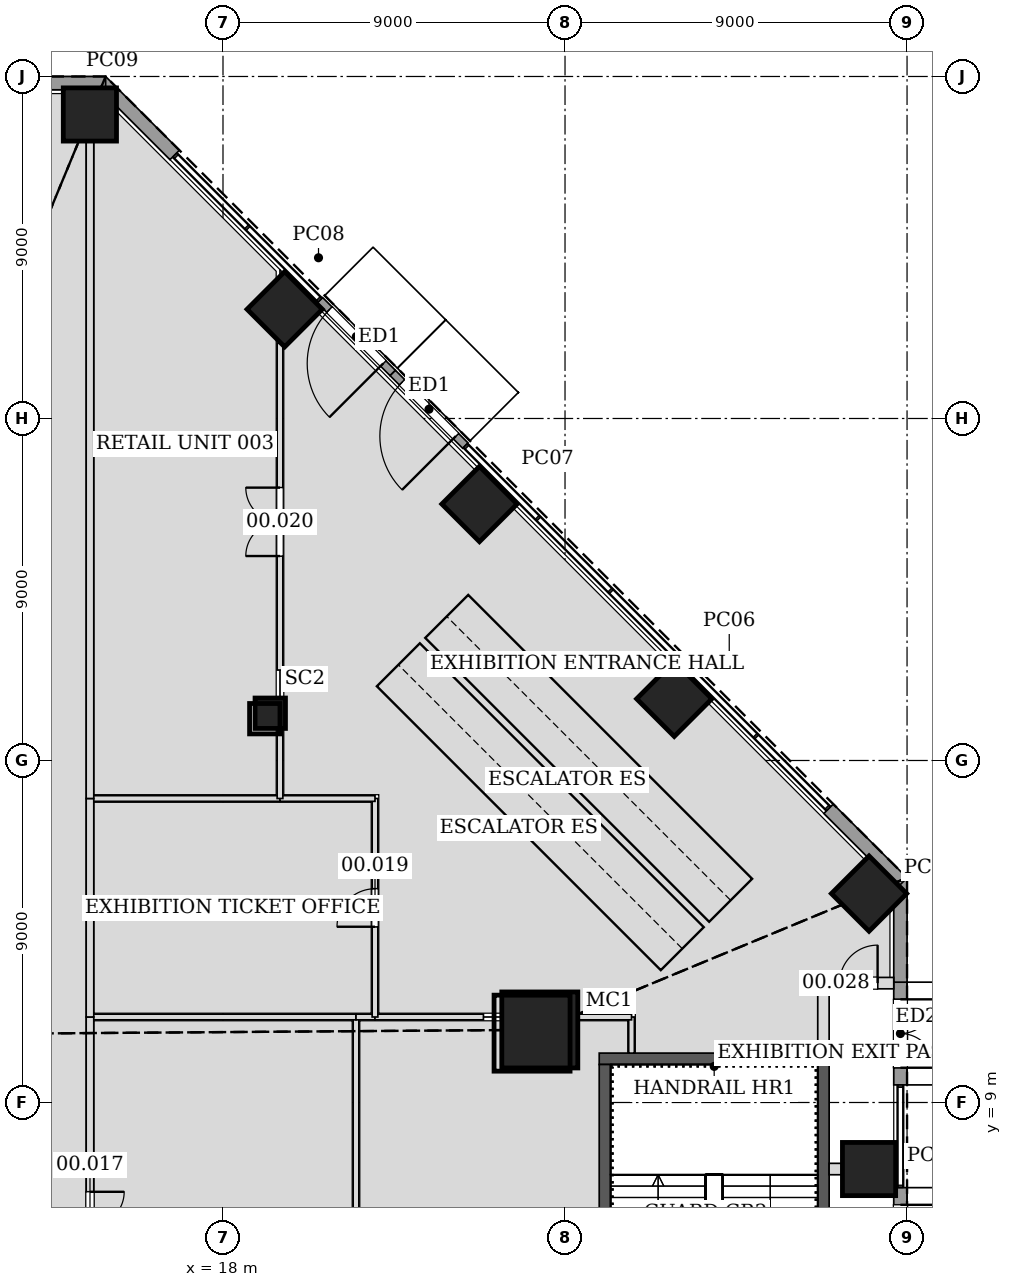
"""IFC4 building model, lengths in metres.
Left out: names, types, materials, properties, quantities, classifications, styles, units other than length and angle.
Written with IfcOpenShell. Run it as: python <this file> out.ifc"""

import sys

from ifc_helpers import new_model, si_unit, direction, frame, frame_2d, origin, origin_2d, place, context, subcontext, project, spatial, rectangle, hollow_rectangle, extrude, element, fill, save


model = new_model("IFC4")
c1 = context("Model", 3, precision=1e-05, world=origin(), true_north=direction((0.0, 1.0)))
c2 = subcontext(c1, "Body", "Model", "MODEL_VIEW")
j1 = project(units=[si_unit("LENGTHUNIT", "METRE"), si_unit("PLANEANGLEUNIT", "RADIAN")], contexts=[c1])
p1 = place(None, origin())
s1 = spatial("IfcSite", under=j1, at=p1, CompositionType="ELEMENT")
p2 = place(p1, origin())
s2 = spatial("IfcBuilding", under=s1, at=p2, CompositionType="ELEMENT")
p3 = place(p2, origin())
s3 = spatial("IfcBuildingStorey", under=s2, at=p3, CompositionType="ELEMENT", Elevation=0.0)
p4 = place(p3, frame((26.336, 10.909, 0.0), z_axis=(-0.028266568786, -0.011726897842, 0.999531630793), x_axis=(0.383199413132, -0.923665637433, 0.0)))
e1 = element("IfcColumn", 1, at=p4, inside=s3, PredefinedType="COLUMN", context=c2, shape_type="SweptSolid", body=[
    extrude(hollow_rectangle(XDim=2.0, YDim=2.0, WallThickness=0.09, at=origin_2d()), origin(), (0.0, 0.0, 1.0), 7.203),
])
p5 = place(p3, frame((19.244, 19.244, 0.0), z_axis=(-0.019998101035, -0.019998101035, 0.999599995953), x_axis=(0.707106781187, -0.707106781187, 0.0)))
e2 = element("IfcColumn", 2, at=p5, inside=s3, PredefinedType="COLUMN", context=c2, shape_type="SweptSolid", body=[
    extrude(hollow_rectangle(XDim=0.8, YDim=0.8, WallThickness=0.05, at=origin_2d()), origin(), (0.0, 0.0, 1.0), 7.203),
])
for number, where, z_axis, x_axis in (
    (3, (35.0, 7.249, 0.0), (0.0, 0.0, 1.0), (1.0, 0.0, 0.0)),
    (4, (35.0, 14.498, 0.0), (0.0, 0.0, 1.0), (0.707, 0.707, 0.0)),
    (5, (29.874, 19.623, 0.0), (0.0, 0.0, 1.0), (0.707, 0.707, 0.0)),
    (6, (24.749, 24.749, 0.0), (0.0, 0.0, 1.0), (0.707, 0.707, 0.0)),
    (7, (19.623, 29.874, 0.0), (0.0, 0.0, 1.0), (0.707, 0.707, 0.0)),
    (8, (14.498, 35.0, 0.0), (0.0, 0.0, 1.0), (1.0, 0.0, 0.0)),
):
    element("IfcColumn", number, at=place(p3, frame(where, z_axis=z_axis, x_axis=x_axis)), inside=s3, PredefinedType="COLUMN", context=c2, shape_type="SweptSolid", body=[
        extrude(rectangle(XDim=1.4, YDim=1.4, at=origin_2d()), origin(), (0.0, 0.0, 1.0), 7.2),
    ])
p6 = place(p3, frame((33.95, 10.15, 0.0), z_axis=(0.0, 0.0, 1.0), x_axis=(-1.0, 0.0, 0.0)))
e9 = element("IfcWall", 9, at=p6, inside=s3, PredefinedType="SOLIDWALL", context=c2, shape_type="SweptSolid", body=[
    extrude(rectangle(XDim=6.05, YDim=0.3, at=frame_2d((3.025, 0.0))), origin(), (0.0, 0.0, 1.0), 7.2),
])
p7 = place(p3, frame((28.05, 10.0, 0.0), z_axis=(0.0, 0.0, 1.0), x_axis=(0.0, -1.0, 0.0)))
e10 = element("IfcWall", 10, at=p7, inside=s3, PredefinedType="SOLIDWALL", context=c2, shape_type="SweptSolid", body=[
    extrude(rectangle(XDim=9.6, YDim=0.3, at=frame_2d((4.8, 0.0))), origin(), (0.0, 0.0, 1.0), 7.2),
])
p8 = place(p3, frame((33.8, 0.4, 0.0), z_axis=(0.0, 0.0, 1.0), x_axis=(0.0, 1.0, 0.0)))
e11 = element("IfcWall", 11, at=p8, inside=s3, PredefinedType="SOLIDWALL", context=c2, shape_type="SweptSolid", body=[
    extrude(rectangle(XDim=9.6, YDim=0.3, at=frame_2d((4.8, 0.0))), origin(), (0.0, 0.0, 1.0), 7.2),
])
p9 = place(p8, frame((0.75, 0.0, 0.0)))
e12 = element("IfcOpeningElement", 12, at=p9, cuts=e11, PredefinedType="OPENING", context=c2, shape_type="SweptSolid", body=[
    extrude(rectangle(XDim=1.0, YDim=2.1, at=frame_2d((0.5, 1.05))), frame((0.0, 0.16, 0.0), z_axis=(0.0, -1.0, 0.0), x_axis=(1.0, 0.0, 0.0)), (0.0, 0.0, 1.0), 0.32),
])
p10 = place(p3, frame((35.825, 4.055, 0.0), z_axis=(0.0, 0.0, 1.0), x_axis=(0.0, 1.0, 0.0)))
e13 = element("IfcWall", 13, at=p10, inside=s3, PredefinedType="SOLIDWALL", context=c2, shape_type="SweptSolid", body=[
    extrude(rectangle(XDim=2.704, YDim=0.35, at=frame_2d((1.352, 0.0))), origin(), (0.0, 0.0, 1.0), 6.9),
])
p11 = place(p10, frame((0.452, 0.0, 0.0)))
e14 = element("IfcOpeningElement", 14, at=p11, cuts=e13, PredefinedType="OPENING", context=c2, shape_type="SweptSolid", body=[
    extrude(rectangle(XDim=1.8, YDim=2.4, at=frame_2d((0.9, 1.2))), frame((0.0, 0.185, 0.0), z_axis=(0.0, -1.0, 0.0), x_axis=(1.0, 0.0, 0.0)), (0.0, 0.0, 1.0), 0.37),
])
p12 = place(p3, frame((35.825, 9.463, 0.0), z_axis=(0.0, 0.0, 1.0), x_axis=(0.0, 1.0, 0.0)))
e15 = element("IfcWall", 15, at=p12, inside=s3, PredefinedType="SOLIDWALL", context=c2, shape_type="SweptSolid", body=[
    extrude(rectangle(XDim=2.704, YDim=0.35, at=frame_2d((1.352, 0.0))), origin(), (0.0, 0.0, 1.0), 6.9),
])
p13 = place(p12, frame((0.452, 0.0, 0.0)))
e16 = element("IfcOpeningElement", 16, at=p13, cuts=e15, PredefinedType="OPENING", context=c2, shape_type="SweptSolid", body=[
    extrude(rectangle(XDim=1.8, YDim=2.4, at=frame_2d((0.9, 1.2))), frame((0.0, 0.185, 0.0), z_axis=(0.0, -1.0, 0.0), x_axis=(1.0, 0.0, 0.0)), (0.0, 0.0, 1.0), 0.37),
])
for number, where, z_axis, x_axis in (
    (17, (35.825, 12.167, 0.0), (0.0, 0.0, 1.0), (0.0, 1.0, 0.0)),
    (18, (35.876, 14.788, 0.0), (0.0, 0.0, 1.0), (-0.707, 0.707, 0.0)),
):
    element("IfcWall", number, at=place(p3, frame(where, z_axis=z_axis, x_axis=x_axis)), inside=s3, PredefinedType="SOLIDWALL", context=c2, shape_type="SweptSolid", body=[
        extrude(rectangle(XDim=2.745, YDim=0.35, at=frame_2d((1.373, 0.0))), origin(), (0.0, 0.0, 1.0), 6.9),
    ])
p14 = place(p3, frame((24.376, 26.288, 0.0), z_axis=(0.0, 0.0, 1.0), x_axis=(-0.707151930551, 0.707061628939, 0.0)))
e19 = element("IfcWall", 19, at=p14, inside=s3, PredefinedType="SOLIDWALL", context=c2, shape_type="SweptSolid", body=[
    extrude(rectangle(XDim=2.704, YDim=0.2, at=frame_2d((1.352, 0.0))), origin(), (0.0, 0.0, 1.0), 6.9),
])
p15 = place(p14, frame((0.352, 0.0, 0.0)))
e20 = element("IfcOpeningElement", 20, at=p15, cuts=e19, PredefinedType="OPENING", context=c2, shape_type="SweptSolid", body=[
    extrude(rectangle(XDim=2.0, YDim=3.0, at=frame_2d((1.0, 1.5))), frame((0.0, 0.11, 0.0), z_axis=(0.0, -1.0, 0.0), x_axis=(1.0, 0.0, 0.0)), (0.0, 0.0, 1.0), 0.22),
])
p16 = place(p3, frame((22.464, 28.2, 0.0), z_axis=(0.0, 0.0, 1.0), x_axis=(-0.707061628939, 0.707151930551, 0.0)))
e21 = element("IfcWall", 21, at=p16, inside=s3, PredefinedType="SOLIDWALL", context=c2, shape_type="SweptSolid", body=[
    extrude(rectangle(XDim=2.704, YDim=0.2, at=frame_2d((1.352, 0.0))), origin(), (0.0, 0.0, 1.0), 6.9),
])
p17 = place(p16, frame((0.352, 0.0, 0.0)))
e22 = element("IfcOpeningElement", 22, at=p17, cuts=e21, PredefinedType="OPENING", context=c2, shape_type="SweptSolid", body=[
    extrude(rectangle(XDim=2.0, YDim=3.0, at=frame_2d((1.0, 1.5))), frame((0.0, 0.11, 0.0), z_axis=(0.0, -1.0, 0.0), x_axis=(1.0, 0.0, 0.0)), (0.0, 0.0, 1.0), 0.22),
])
for number, where, z_axis, x_axis in (
    (23, (16.729, 33.935, 0.0), (0.0, 0.0, 1.0), (-0.707, 0.707, 0.0)),
    (24, (14.912, 35.825, 0.0), (0.0, 0.0, 1.0), (-1.0, 0.0, 0.0)),
):
    element("IfcWall", number, at=place(p3, frame(where, z_axis=z_axis, x_axis=x_axis)), inside=s3, PredefinedType="SOLIDWALL", context=c2, shape_type="SweptSolid", body=[
        extrude(rectangle(XDim=2.745, YDim=0.35, at=frame_2d((1.373, 0.0))), origin(), (0.0, 0.0, 1.0), 6.9),
    ])
p18 = place(p3, frame((34.281, 7.249, 0.0), z_axis=(0.0, 0.0, 1.0), x_axis=(-1.0, 0.0, 0.0)))
e25 = element("IfcWall", 25, at=p18, inside=s3, PredefinedType="PARTITIONING", context=c2, shape_type="SweptSolid", body=[
    extrude(rectangle(XDim=0.332, YDim=0.3, at=frame_2d((0.166, 0.0))), origin(), (0.0, 0.0, 1.0), 6.291),
])
p19 = place(p3, frame((35.65, 12.141, 0.0), z_axis=(0.0, 0.0, 1.0), x_axis=(-1.0, 0.0, 0.0)))
e26 = element("IfcWall", 26, at=p19, inside=s3, PredefinedType="PARTITIONING", context=c2, shape_type="SweptSolid", body=[
    extrude(rectangle(XDim=1.85, YDim=0.3, at=frame_2d((0.925, 0.0))), origin(), (0.0, 0.0, 1.0), 5.93),
])
p20 = place(p19, frame((0.425, 0.0, 0.0)))
e27 = element("IfcOpeningElement", 27, at=p20, cuts=e26, PredefinedType="OPENING", context=c2, shape_type="SweptSolid", body=[
    extrude(rectangle(XDim=1.0, YDim=2.1, at=frame_2d((0.5, 1.05))), frame((0.0, 0.16, 0.0), z_axis=(0.0, -1.0, 0.0), x_axis=(1.0, 0.0, 0.0)), (0.0, 0.0, 1.0), 0.32),
])
p21 = place(p3, frame((33.8, 12.141, 0.0), z_axis=(0.0, 0.0, 1.0), x_axis=(0.0, -1.0, 0.0)))
e28 = element("IfcWall", 28, at=p21, inside=s3, PredefinedType="PARTITIONING", context=c2, shape_type="SweptSolid", body=[
    extrude(rectangle(XDim=1.842, YDim=0.3, at=frame_2d((0.921, 0.0))), origin(), (0.0, 0.0, 1.0), 6.9),
])
p22 = place(p3, frame((21.5, 0.25, 0.0), z_axis=(0.0, 0.0, 1.0), x_axis=(0.0, 1.0, 0.0)))
e29 = element("IfcWall", 29, at=p22, inside=s3, PredefinedType="PARTITIONING", context=c2, shape_type="SweptSolid", body=[
    extrude(rectangle(XDim=11.0, YDim=0.15, at=frame_2d((5.5, 0.0))), origin(), (0.0, 0.0, 1.0), 5.59),
])
p23 = place(p3, frame((21.5, 11.25, 0.0), z_axis=(0.0, 0.0, 1.0), x_axis=(-1.0, 0.0, 0.0)))
e30 = element("IfcWall", 30, at=p23, inside=s3, PredefinedType="PARTITIONING", context=c2, shape_type="SweptSolid", body=[
    extrude(rectangle(XDim=7.0, YDim=0.15, at=frame_2d((3.5, 0.0))), origin(), (0.0, 0.0, 1.0), 6.44),
])
p24 = place(p3, frame((14.5, 11.25, 0.0), z_axis=(0.0, 0.0, 1.0), x_axis=(0.0, -1.0, 0.0)))
e31 = element("IfcWall", 31, at=p24, inside=s3, PredefinedType="PARTITIONING", context=c2, shape_type="SweptSolid", body=[
    extrude(rectangle(XDim=11.0, YDim=0.2, at=frame_2d((5.5, 0.0))), origin(), (0.0, 0.0, 1.0), 5.59),
])
p25 = place(p24, frame((4.6, 0.0, 0.0)))
e32 = element("IfcOpeningElement", 32, at=p25, cuts=e31, PredefinedType="OPENING", context=c2, shape_type="SweptSolid", body=[
    extrude(rectangle(XDim=1.8, YDim=2.4, at=frame_2d((0.9, 1.2))), frame((0.0, 0.11, 0.0), z_axis=(0.0, -1.0, 0.0), x_axis=(1.0, 0.0, 0.0)), (0.0, 0.0, 1.0), 0.22),
])
p26 = place(p3, frame((22.001, 11.25, 0.0), z_axis=(0.0, 0.0, 1.0), x_axis=(-1.0, 0.0, 0.0)))
e33 = element("IfcWall", 33, at=p26, inside=s3, PredefinedType="PARTITIONING", context=c2, shape_type="SweptSolid", body=[
    extrude(rectangle(XDim=0.501, YDim=0.15, at=frame_2d((0.25, 0.0))), origin(), (0.0, 0.0, 1.0), 6.9),
])
p27 = place(p3, frame((28.75, 10.3, 0.0), z_axis=(0.0, 0.0, 1.0), x_axis=(0.0, 1.0, 0.0)))
e34 = element("IfcWall", 34, at=p27, inside=s3, PredefinedType="PARTITIONING", context=c2, shape_type="SweptSolid", body=[
    extrude(rectangle(XDim=0.95, YDim=0.15, at=frame_2d((0.475, 0.0))), origin(), (0.0, 0.0, 1.0), 6.364),
])
p28 = place(p3, frame((28.75, 11.25, 0.0), z_axis=(0.0, 0.0, 1.0), x_axis=(-1.0, 0.0, 0.0)))
e35 = element("IfcWall", 35, at=p28, inside=s3, PredefinedType="PARTITIONING", context=c2, shape_type="SweptSolid", body=[
    extrude(rectangle(XDim=1.451, YDim=0.15, at=frame_2d((0.726, 0.0))), origin(), (0.0, 0.0, 1.0), 6.207),
])
p29 = place(p3, frame((24.853, 11.25, 0.0), z_axis=(0.0, 0.0, 1.0), x_axis=(-1.0, 0.0, 0.0)))
e36 = element("IfcWall", 36, at=p29, inside=s3, PredefinedType="PARTITIONING", context=c2, shape_type="SweptSolid", body=[
    extrude(rectangle(XDim=2.854, YDim=0.15, at=frame_2d((1.427, 0.0))), origin(), (0.0, 0.0, 1.0), 6.049),
])
p30 = place(p3, frame((19.501, 17.0, 0.0), z_axis=(0.0, 0.0, 1.0), x_axis=(-1.0, 0.0, 0.0)))
e37 = element("IfcWall", 37, at=p30, inside=s3, PredefinedType="PARTITIONING", context=c2, shape_type="SweptSolid", body=[
    extrude(rectangle(XDim=5.001, YDim=0.15, at=frame_2d((2.5, 0.0))), origin(), (0.0, 0.0, 1.0), 5.79),
])
p31 = place(p3, frame((22.0, 11.25, 0.0), z_axis=(0.0, 0.0, 1.0), x_axis=(0.0, 1.0, 0.0)))
e38 = element("IfcWall", 38, at=p31, inside=s3, PredefinedType="PARTITIONING", context=c2, shape_type="SweptSolid", body=[
    extrude(rectangle(XDim=5.75, YDim=0.15, at=frame_2d((2.875, 0.0))), origin(), (0.0, 0.0, 1.0), 5.879),
])
p32 = place(p31, frame((2.375, 0.0, 0.0)))
e39 = element("IfcOpeningElement", 39, at=p32, cuts=e38, PredefinedType="OPENING", context=c2, shape_type="SweptSolid", body=[
    extrude(rectangle(XDim=1.0, YDim=2.1, at=frame_2d((0.5, 1.05))), frame((0.0, 0.085, 0.0), z_axis=(0.0, -1.0, 0.0), x_axis=(1.0, 0.0, 0.0)), (0.0, 0.0, 1.0), 0.17),
])
p33 = place(p3, frame((22.0, 17.0, 0.0), z_axis=(0.0, 0.0, 1.0), x_axis=(-1.0, 0.0, 0.0)))
e40 = element("IfcWall", 40, at=p33, inside=s3, PredefinedType="PARTITIONING", context=c2, shape_type="SweptSolid", body=[
    extrude(rectangle(XDim=2.501, YDim=0.15, at=frame_2d((1.25, 0.0))), origin(), (0.0, 0.0, 1.0), 5.879),
])
p34 = place(p3, frame((14.5, 17.0, 0.0), z_axis=(0.0, 0.0, 1.0), x_axis=(0.0, -1.0, 0.0)))
e41 = element("IfcWall", 41, at=p34, inside=s3, PredefinedType="PARTITIONING", context=c2, shape_type="SweptSolid", body=[
    extrude(rectangle(XDim=5.75, YDim=0.2, at=frame_2d((2.875, 0.0))), origin(), (0.0, 0.0, 1.0), 5.79),
])
p35 = place(p3, frame((19.5, 17.0, 0.0), z_axis=(0.0, 0.0, 1.0), x_axis=(0.0, 1.0, 0.0)))
e42 = element("IfcWall", 42, at=p35, inside=s3, PredefinedType="PARTITIONING", context=c2, shape_type="SweptSolid", body=[
    extrude(rectangle(XDim=1.907, YDim=0.15, at=frame_2d((0.954, 0.0))), origin(), (0.0, 0.0, 1.0), 5.879),
])
p36 = place(p3, frame((19.5, 19.58, 0.0), z_axis=(0.0, 0.0, 1.0), x_axis=(0.0, 1.0, 0.0)))
e43 = element("IfcWall", 43, at=p36, inside=s3, PredefinedType="PARTITIONING", context=c2, shape_type="SweptSolid", body=[
    extrude(rectangle(XDim=9.401, YDim=0.15, at=frame_2d((4.7, 0.0))), origin(), (0.0, 0.0, 1.0), 5.907),
])
p37 = place(p36, frame((3.8, 0.0, 0.0)))
e44 = element("IfcOpeningElement", 44, at=p37, cuts=e43, PredefinedType="OPENING", context=c2, shape_type="SweptSolid", body=[
    extrude(rectangle(XDim=1.8, YDim=2.4, at=frame_2d((0.9, 1.2))), frame((0.0, 0.085, 0.0), z_axis=(0.0, -1.0, 0.0), x_axis=(1.0, 0.0, 0.0)), (0.0, 0.0, 1.0), 0.17),
])
p38 = place(p3, frame((14.5, 34.281, 0.0), z_axis=(0.0, 0.0, 1.0), x_axis=(0.0, -1.0, 0.0)))
e45 = element("IfcWall", 45, at=p38, inside=s3, PredefinedType="PARTITIONING", context=c2, shape_type="SweptSolid", body=[
    extrude(rectangle(XDim=17.281, YDim=0.2, at=frame_2d((8.641, 0.0))), origin(), (0.0, 0.0, 1.0), 5.907),
])
p39 = place(p11, frame((1.8, 0.0, 0.0), z_axis=(0.0, 0.0, 1.0), x_axis=(-1.0, 0.0, 0.0)))
e46 = element("IfcDoor", 46, at=p39, inside=s3, OperationType="DOUBLE_DOOR_SINGLE_SWING", PredefinedType="DOOR", context=c2, shape_type="SweptSolid", body=[
    extrude(rectangle(XDim=1.8, YDim=2.4, at=frame_2d((0.9, 1.2))), frame((0.0, 0.025, 0.0), z_axis=(0.0, -1.0, 0.0), x_axis=(1.0, 0.0, 0.0)), (0.0, 0.0, 1.0), 0.05),
])
fill(e14, e46)
p40 = place(p13, frame((1.8, 0.0, 0.0), z_axis=(0.0, 0.0, 1.0), x_axis=(-1.0, 0.0, 0.0)))
e47 = element("IfcDoor", 47, at=p40, inside=s3, OperationType="DOUBLE_DOOR_SINGLE_SWING", PredefinedType="DOOR", context=c2, shape_type="SweptSolid", body=[
    extrude(rectangle(XDim=1.8, YDim=2.4, at=frame_2d((0.9, 1.2))), frame((0.0, 0.025, 0.0), z_axis=(0.0, -1.0, 0.0), x_axis=(1.0, 0.0, 0.0)), (0.0, 0.0, 1.0), 0.05),
])
fill(e16, e47)
p41 = place(p15, origin())
e48 = element("IfcDoor", 48, at=p41, inside=s3, OperationType="SINGLE_SWING_LEFT", PredefinedType="DOOR", context=c2, shape_type="SweptSolid", body=[
    extrude(rectangle(XDim=2.0, YDim=3.0, at=frame_2d((1.0, 1.5))), frame((0.0, 0.025, 0.0), z_axis=(0.0, -1.0, 0.0), x_axis=(1.0, 0.0, 0.0)), (0.0, 0.0, 1.0), 0.05),
])
fill(e20, e48)
p42 = place(p17, origin())
e49 = element("IfcDoor", 49, at=p42, inside=s3, OperationType="SINGLE_SWING_LEFT", PredefinedType="DOOR", context=c2, shape_type="SweptSolid", body=[
    extrude(rectangle(XDim=2.0, YDim=3.0, at=frame_2d((1.0, 1.5))), frame((0.0, 0.025, 0.0), z_axis=(0.0, -1.0, 0.0), x_axis=(1.0, 0.0, 0.0)), (0.0, 0.0, 1.0), 0.05),
])
fill(e22, e49)
p43 = place(p25, origin())
e50 = element("IfcDoor", 50, at=p43, inside=s3, OperationType="DOUBLE_DOOR_SINGLE_SWING", PredefinedType="DOOR", context=c2, shape_type="SweptSolid", body=[
    extrude(rectangle(XDim=1.8, YDim=2.4, at=frame_2d((0.9, 1.2))), frame((0.0, 0.025, 0.0), z_axis=(0.0, -1.0, 0.0), x_axis=(1.0, 0.0, 0.0)), (0.0, 0.0, 1.0), 0.05),
])
fill(e32, e50)
p44 = place(p32, origin())
e51 = element("IfcDoor", 51, at=p44, inside=s3, OperationType="SINGLE_SWING_LEFT", PredefinedType="DOOR", context=c2, shape_type="SweptSolid", body=[
    extrude(rectangle(XDim=1.0, YDim=2.1, at=frame_2d((0.5, 1.05))), frame((0.0, 0.025, 0.0), z_axis=(0.0, -1.0, 0.0), x_axis=(1.0, 0.0, 0.0)), (0.0, 0.0, 1.0), 0.05),
])
fill(e39, e51)
p45 = place(p37, origin())
e52 = element("IfcDoor", 52, at=p45, inside=s3, OperationType="DOUBLE_DOOR_SINGLE_SWING", PredefinedType="DOOR", context=c2, shape_type="SweptSolid", body=[
    extrude(rectangle(XDim=1.8, YDim=2.4, at=frame_2d((0.9, 1.2))), frame((0.0, 0.025, 0.0), z_axis=(0.0, -1.0, 0.0), x_axis=(1.0, 0.0, 0.0)), (0.0, 0.0, 1.0), 0.05),
])
fill(e44, e52)
p46 = place(p20, frame((1.0, 0.0, 0.0), z_axis=(0.0, 0.0, 1.0), x_axis=(-1.0, 0.0, 0.0)))
e53 = element("IfcDoor", 53, at=p46, inside=s3, OperationType="SINGLE_SWING_RIGHT", PredefinedType="DOOR", context=c2, shape_type="SweptSolid", body=[
    extrude(rectangle(XDim=1.0, YDim=2.1, at=frame_2d((0.5, 1.05))), frame((0.0, 0.025, 0.0), z_axis=(0.0, -1.0, 0.0), x_axis=(1.0, 0.0, 0.0)), (0.0, 0.0, 1.0), 0.05),
])
fill(e27, e53)
save(model, sys.argv[1])
